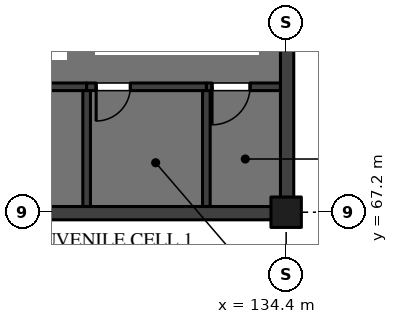
"""IFC4 building model, lengths in metres.
Left out: names, types, materials, properties, quantities, classifications, styles, units other than length and angle.
Written with IfcOpenShell. Run it as: python <this file> out.ifc"""

import sys

from ifc_helpers import new_model, si_unit, direction, frame, frame_2d, origin, origin_2d, place, context, subcontext, project, spatial, rectangle, extrude, element, fill, save


model = new_model("IFC4")
c1 = context("Model", 3, precision=1e-05, world=origin(), true_north=direction((0.0, 1.0)))
c2 = subcontext(c1, "Body", "Model", "MODEL_VIEW")
j1 = project(units=[si_unit("LENGTHUNIT", "METRE"), si_unit("PLANEANGLEUNIT", "RADIAN")], contexts=[c1])
p1 = place(None, origin())
s1 = spatial("IfcSite", under=j1, at=p1, CompositionType="ELEMENT")
p2 = place(p1, origin())
s2 = spatial("IfcBuilding", under=s1, at=p2, CompositionType="ELEMENT")
p3 = place(p2, origin())
s3 = spatial("IfcBuildingStorey", under=s2, at=p3, CompositionType="ELEMENT", Elevation=0.0)
p4 = place(p3, frame((134.4, 67.2, 0.0), z_axis=(0.0, 0.0, 1.0), x_axis=(1.0, 0.0, 0.0)))
e1 = element("IfcColumn", 1, at=p4, inside=s3, PredefinedType="COLUMN", context=c2, shape_type="SweptSolid", body=[
    extrude(rectangle(XDim=0.8, YDim=0.8, at=origin_2d()), origin(), (0.0, 0.0, 1.0), 5.05),
])
p5 = place(p3, frame((132.3, 70.5, 0.0), z_axis=(0.0, 0.0, 1.0), x_axis=(1.0, 0.0, 0.0)))
e2 = element("IfcWall", 2, at=p5, inside=s3, PredefinedType="PARTITIONING", context=c2, shape_type="SweptSolid", body=[
    extrude(rectangle(XDim=1.95, YDim=0.2, at=frame_2d((0.975, 0.0))), origin(), (0.0, 0.0, 1.0), 5.05),
])
p6 = place(p5, frame((0.15, 0.0, 0.0)))
e3 = element("IfcOpeningElement", 3, at=p6, cuts=e2, PredefinedType="OPENING", context=c2, shape_type="SweptSolid", body=[
    extrude(rectangle(XDim=1.0, YDim=2.1, at=frame_2d((0.5, 1.05))), frame((0.0, 0.11, 0.0), z_axis=(0.0, -1.0, 0.0), x_axis=(1.0, 0.0, 0.0)), (0.0, 0.0, 1.0), 0.22),
])
p7 = place(p3, frame((126.0, 70.5, 0.0), z_axis=(0.0, 0.0, 1.0), x_axis=(1.0, 0.0, 0.0)))
e4 = element("IfcWall", 4, at=p7, inside=s3, PredefinedType="PARTITIONING", context=c2, shape_type="SweptSolid", body=[
    extrude(rectangle(XDim=3.15, YDim=0.2, at=frame_2d((1.575, 0.0))), origin(), (0.0, 0.0, 1.0), 5.05),
])
p8 = place(p7, frame((0.25, 0.0, 0.0)))
e5 = element("IfcOpeningElement", 5, at=p8, cuts=e4, PredefinedType="OPENING", context=c2, shape_type="SweptSolid", body=[
    extrude(rectangle(XDim=0.9, YDim=2.1, at=frame_2d((0.45, 1.05))), frame((0.0, 0.11, 0.0), z_axis=(0.0, -1.0, 0.0), x_axis=(1.0, 0.0, 0.0)), (0.0, 0.0, 1.0), 0.22),
])
p9 = place(p3, frame((129.15, 70.5, 0.0), z_axis=(0.0, 0.0, 1.0), x_axis=(1.0, 0.0, 0.0)))
e6 = element("IfcWall", 6, at=p9, inside=s3, PredefinedType="PARTITIONING", context=c2, shape_type="SweptSolid", body=[
    extrude(rectangle(XDim=3.15, YDim=0.2, at=frame_2d((1.575, 0.0))), origin(), (0.0, 0.0, 1.0), 5.05),
])
p10 = place(p9, frame((0.25, 0.0, 0.0)))
e7 = element("IfcOpeningElement", 7, at=p10, cuts=e6, PredefinedType="OPENING", context=c2, shape_type="SweptSolid", body=[
    extrude(rectangle(XDim=0.9, YDim=2.1, at=frame_2d((0.45, 1.05))), frame((0.0, 0.11, 0.0), z_axis=(0.0, -1.0, 0.0), x_axis=(1.0, 0.0, 0.0)), (0.0, 0.0, 1.0), 0.22),
])
for number, where, z_axis, x_axis in (
    (8, (132.3, 67.35, 0.0), (0.0, 0.0, 1.0), (0.0, 1.0, 0.0)),
    (9, (129.15, 67.35, 0.0), (0.0, 0.0, 1.0), (0.0, 1.0, 0.0)),
):
    element("IfcWall", number, at=place(p3, frame(where, z_axis=z_axis, x_axis=x_axis)), inside=s3, PredefinedType="PARTITIONING", context=c2, shape_type="SweptSolid", body=[
        extrude(rectangle(XDim=3.05, YDim=0.2, at=frame_2d((1.525, 0.0))), origin(), (0.0, 0.0, 1.0), 5.05),
    ])
p11 = place(p3, frame((126.43, 67.175, 0.0), z_axis=(0.0, 0.0, 1.0), x_axis=(1.0, 0.0, 0.0)))
e10 = element("IfcWall", 10, at=p11, inside=s3, PredefinedType="SOLIDWALL", context=c2, shape_type="SweptSolid", body=[
    extrude(rectangle(XDim=7.59, YDim=0.35, at=frame_2d((3.795, 0.0))), origin(), (0.0, 0.0, 1.0), 5.05),
])
p12 = place(p3, frame((134.425, 67.58, 0.0), z_axis=(0.0, 0.0, 1.0), x_axis=(0.0, 1.0, 0.0)))
e11 = element("IfcWall", 11, at=p12, inside=s3, PredefinedType="SOLIDWALL", context=c2, shape_type="SweptSolid", body=[
    extrude(rectangle(XDim=7.82, YDim=0.35, at=frame_2d((3.91, 0.0))), origin(), (0.0, 0.0, 1.0), 5.05),
])
p13 = place(p6, frame((1.0, 0.0, 0.0), z_axis=(0.0, 0.0, 1.0), x_axis=(-1.0, 0.0, 0.0)))
e12 = element("IfcDoor", 12, at=p13, inside=s3, OperationType="SINGLE_SWING_LEFT", PredefinedType="DOOR", context=c2, shape_type="SweptSolid", body=[
    extrude(rectangle(XDim=1.0, YDim=2.1, at=frame_2d((0.5, 1.05))), frame((0.0, 0.045, 0.0), z_axis=(0.0, -1.0, 0.0), x_axis=(1.0, 0.0, 0.0)), (0.0, 0.0, 1.0), 0.09),
])
fill(e3, e12)
p14 = place(p10, frame((0.9, 0.0, 0.0), z_axis=(0.0, 0.0, 1.0), x_axis=(-1.0, 0.0, 0.0)))
e13 = element("IfcDoor", 13, at=p14, inside=s3, OperationType="SINGLE_SWING_LEFT", PredefinedType="DOOR", context=c2, shape_type="SweptSolid", body=[
    extrude(rectangle(XDim=0.9, YDim=2.1, at=frame_2d((0.45, 1.05))), frame((0.0, 0.04, 0.0), z_axis=(0.0, -1.0, 0.0), x_axis=(1.0, 0.0, 0.0)), (0.0, 0.0, 1.0), 0.08),
])
fill(e7, e13)
save(model, sys.argv[1])
